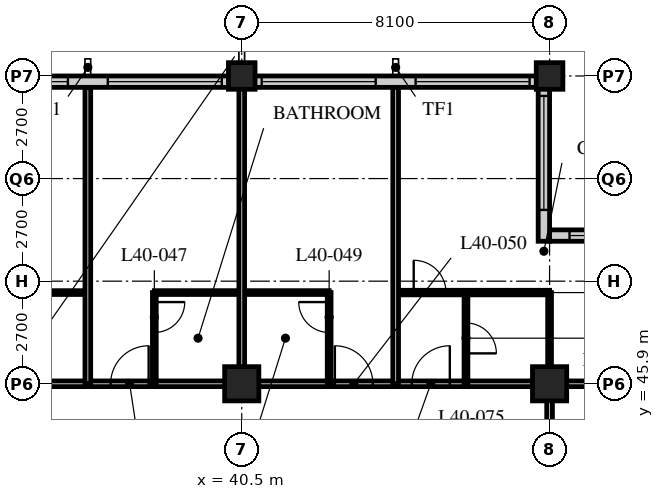
"""IFC4 building model, lengths in metres.
Left out: names, types, materials, properties, quantities, classifications, styles, units other than length and angle.
Written with IfcOpenShell. Run it as: python <this file> out.ifc"""

import sys

from ifc_helpers import new_model, si_unit, direction, frame, frame_2d, origin, origin_2d, place, context, subcontext, project, spatial, rectangle, hollow_rectangle, extrude, element, fill, save


model = new_model("IFC4")
c1 = context("Model", 3, precision=1e-05, world=origin(), true_north=direction((0.0, 1.0)))
c2 = subcontext(c1, "Body", "Model", "MODEL_VIEW")
j1 = project(units=[si_unit("LENGTHUNIT", "METRE"), si_unit("PLANEANGLEUNIT", "RADIAN")], contexts=[c1])
p1 = place(None, origin())
s1 = spatial("IfcSite", under=j1, at=p1, CompositionType="ELEMENT")
p2 = place(p1, origin())
s2 = spatial("IfcBuilding", under=s1, at=p2, CompositionType="ELEMENT")
p3 = place(p2, frame((0.0, 0.0, 154.4)))
s3 = spatial("IfcBuildingStorey", under=s2, at=p3, CompositionType="ELEMENT", Elevation=154.4)
p4 = place(p3, frame((40.5, 45.9, 0.0), z_axis=(0.0, 0.0, 1.0), x_axis=(1.0, 0.0, 0.0)))
e1 = element("IfcColumn", 1, at=p4, inside=s3, PredefinedType="COLUMN", context=c2, shape_type="SweptSolid", body=[
    extrude(hollow_rectangle(XDim=0.9, YDim=0.9, WallThickness=0.1, at=origin_2d()), origin(), (0.0, 0.0, 1.0), 3.4),
])
p5 = place(p3, frame((40.5, 54.0, 0.0), z_axis=(0.0, 0.0, 1.0), x_axis=(1.0, 0.0, 0.0)))
e2 = element("IfcColumn", 2, at=p5, inside=s3, PredefinedType="COLUMN", context=c2, shape_type="SweptSolid", body=[
    extrude(hollow_rectangle(XDim=0.7, YDim=0.7, WallThickness=0.07, at=origin_2d()), origin(), (0.0, 0.0, 1.0), 3.4),
])
p6 = place(p3, frame((48.6, 45.9, 0.0), z_axis=(0.0, 0.0, 1.0), x_axis=(1.0, 0.0, 0.0)))
e3 = element("IfcColumn", 3, at=p6, inside=s3, PredefinedType="COLUMN", context=c2, shape_type="SweptSolid", body=[
    extrude(hollow_rectangle(XDim=0.9, YDim=0.9, WallThickness=0.1, at=origin_2d()), origin(), (0.0, 0.0, 1.0), 3.4),
])
p7 = place(p3, frame((48.6, 54.0, 0.0), z_axis=(0.0, 0.0, 1.0), x_axis=(1.0, 0.0, 0.0)))
e4 = element("IfcColumn", 4, at=p7, inside=s3, PredefinedType="COLUMN", context=c2, shape_type="SweptSolid", body=[
    extrude(hollow_rectangle(XDim=0.7, YDim=0.7, WallThickness=0.07, at=origin_2d()), origin(), (0.0, 0.0, 1.0), 3.4),
])
p8 = place(p3, frame((52.35, 49.8, 0.0), z_axis=(0.0, 0.0, 1.0), x_axis=(-1.0, 0.0, 0.0)))
e5 = element("IfcWall", 5, at=p8, inside=s3, PredefinedType="SOLIDWALL", context=c2, shape_type="SweptSolid", body=[
    extrude(rectangle(XDim=3.75, YDim=0.3, at=frame_2d((1.875, 0.0))), origin(), (0.0, 0.0, 1.0), 2.45),
])
p9 = place(p8, frame((0.225, 0.0, 0.9)))
e6 = element("IfcOpeningElement", 6, at=p9, cuts=e5, PredefinedType="OPENING", context=c2, shape_type="SweptSolid", body=[
    extrude(rectangle(XDim=3.0, YDim=1.2, at=frame_2d((1.5, 0.6))), frame((0.0, 0.16, 0.0), z_axis=(0.0, -1.0, 0.0), x_axis=(1.0, 0.0, 0.0)), (0.0, 0.0, 1.0), 0.32),
])
p10 = place(p3, frame((48.45, 49.65, 0.0), z_axis=(0.0, 0.0, 1.0), x_axis=(0.0, 1.0, 0.0)))
e7 = element("IfcWall", 7, at=p10, inside=s3, PredefinedType="SOLIDWALL", context=c2, shape_type="SweptSolid", body=[
    extrude(rectangle(XDim=4.35, YDim=0.3, at=frame_2d((2.175, 0.0))), origin(), (0.0, 0.0, 1.0), 2.15),
])
p11 = place(p10, frame((0.825, 0.0, 0.9)))
e8 = element("IfcOpeningElement", 8, at=p11, cuts=e7, PredefinedType="OPENING", context=c2, shape_type="SweptSolid", body=[
    extrude(rectangle(XDim=3.0, YDim=1.2, at=frame_2d((1.5, 0.6))), frame((0.0, 0.16, 0.0), z_axis=(0.0, -1.0, 0.0), x_axis=(1.0, 0.0, 0.0)), (0.0, 0.0, 1.0), 0.32),
])
p12 = place(p3, frame((48.3, 53.85, 0.0), z_axis=(0.0, 0.0, 1.0), x_axis=(-1.0, 0.0, 0.0)))
e9 = element("IfcWall", 9, at=p12, inside=s3, PredefinedType="SOLIDWALL", context=c2, shape_type="SweptSolid", body=[
    extrude(rectangle(XDim=40.2, YDim=0.3, at=frame_2d((20.1, 0.0))), origin(), (0.0, 0.0, 1.0), 2.15),
])
p13 = place(p12, frame((0.225, 0.0, 0.9)))
e10 = element("IfcOpeningElement", 10, at=p13, cuts=e9, PredefinedType="OPENING", context=c2, shape_type="SweptSolid", body=[
    extrude(rectangle(XDim=3.0, YDim=1.2, at=frame_2d((1.5, 0.6))), frame((0.0, 0.16, 0.0), z_axis=(0.0, -1.0, 0.0), x_axis=(1.0, 0.0, 0.0)), (0.0, 0.0, 1.0), 0.32),
])
p14 = place(p12, frame((4.275, 0.0, 0.9)))
e11 = element("IfcOpeningElement", 11, at=p14, cuts=e9, PredefinedType="OPENING", context=c2, shape_type="SweptSolid", body=[
    extrude(rectangle(XDim=3.0, YDim=1.2, at=frame_2d((1.5, 0.6))), frame((0.0, 0.16, 0.0), z_axis=(0.0, -1.0, 0.0), x_axis=(1.0, 0.0, 0.0)), (0.0, 0.0, 1.0), 0.32),
])
p15 = place(p12, frame((8.325, 0.0, 0.9)))
e12 = element("IfcOpeningElement", 12, at=p15, cuts=e9, PredefinedType="OPENING", context=c2, shape_type="SweptSolid", body=[
    extrude(rectangle(XDim=3.0, YDim=1.2, at=frame_2d((1.5, 0.6))), frame((0.0, 0.16, 0.0), z_axis=(0.0, -1.0, 0.0), x_axis=(1.0, 0.0, 0.0)), (0.0, 0.0, 1.0), 0.32),
])
p16 = place(p12, frame((12.375, 0.0, 0.9)))
e13 = element("IfcOpeningElement", 13, at=p16, cuts=e9, PredefinedType="OPENING", context=c2, shape_type="SweptSolid", body=[
    extrude(rectangle(XDim=3.0, YDim=1.2, at=frame_2d((1.5, 0.6))), frame((0.0, 0.16, 0.0), z_axis=(0.0, -1.0, 0.0), x_axis=(1.0, 0.0, 0.0)), (0.0, 0.0, 1.0), 0.32),
])
p17 = place(p12, frame((16.425, 0.0, 0.9)))
e14 = element("IfcOpeningElement", 14, at=p17, cuts=e9, PredefinedType="OPENING", context=c2, shape_type="SweptSolid", body=[
    extrude(rectangle(XDim=3.0, YDim=1.2, at=frame_2d((1.5, 0.6))), frame((0.0, 0.16, 0.0), z_axis=(0.0, -1.0, 0.0), x_axis=(1.0, 0.0, 0.0)), (0.0, 0.0, 1.0), 0.32),
])
p18 = place(p12, frame((20.475, 0.0, 0.9)))
e15 = element("IfcOpeningElement", 15, at=p18, cuts=e9, PredefinedType="OPENING", context=c2, shape_type="SweptSolid", body=[
    extrude(rectangle(XDim=3.0, YDim=1.2, at=frame_2d((1.5, 0.6))), frame((0.0, 0.16, 0.0), z_axis=(0.0, -1.0, 0.0), x_axis=(1.0, 0.0, 0.0)), (0.0, 0.0, 1.0), 0.32),
])
p19 = place(p12, frame((24.525, 0.0, 0.9)))
e16 = element("IfcOpeningElement", 16, at=p19, cuts=e9, PredefinedType="OPENING", context=c2, shape_type="SweptSolid", body=[
    extrude(rectangle(XDim=3.0, YDim=1.2, at=frame_2d((1.5, 0.6))), frame((0.0, 0.16, 0.0), z_axis=(0.0, -1.0, 0.0), x_axis=(1.0, 0.0, 0.0)), (0.0, 0.0, 1.0), 0.32),
])
p20 = place(p12, frame((28.575, 0.0, 0.9)))
e17 = element("IfcOpeningElement", 17, at=p20, cuts=e9, PredefinedType="OPENING", context=c2, shape_type="SweptSolid", body=[
    extrude(rectangle(XDim=3.0, YDim=1.2, at=frame_2d((1.5, 0.6))), frame((0.0, 0.16, 0.0), z_axis=(0.0, -1.0, 0.0), x_axis=(1.0, 0.0, 0.0)), (0.0, 0.0, 1.0), 0.32),
])
p21 = place(p12, frame((32.625, 0.0, 0.9)))
e18 = element("IfcOpeningElement", 18, at=p21, cuts=e9, PredefinedType="OPENING", context=c2, shape_type="SweptSolid", body=[
    extrude(rectangle(XDim=3.0, YDim=1.2, at=frame_2d((1.5, 0.6))), frame((0.0, 0.16, 0.0), z_axis=(0.0, -1.0, 0.0), x_axis=(1.0, 0.0, 0.0)), (0.0, 0.0, 1.0), 0.32),
])
p22 = place(p12, frame((36.675, 0.0, 0.9)))
e19 = element("IfcOpeningElement", 19, at=p22, cuts=e9, PredefinedType="OPENING", context=c2, shape_type="SweptSolid", body=[
    extrude(rectangle(XDim=3.0, YDim=1.2, at=frame_2d((1.5, 0.6))), frame((0.0, 0.16, 0.0), z_axis=(0.0, -1.0, 0.0), x_axis=(1.0, 0.0, 0.0)), (0.0, 0.0, 1.0), 0.32),
])
p23 = place(p3, frame((8.1, 45.9, 0.0), z_axis=(0.0, 0.0, 1.0), x_axis=(1.0, 0.0, 0.0)))
e20 = element("IfcWall", 20, at=p23, inside=s3, PredefinedType="PARTITIONING", context=c2, shape_type="SweptSolid", body=[
    extrude(rectangle(XDim=40.5, YDim=0.15, at=frame_2d((20.25, 0.0))), origin(), (0.0, 0.0, 1.0), 2.15),
])
p24 = place(p23, frame((9.625, 0.0, 0.0)))
e21 = element("IfcOpeningElement", 21, at=p24, cuts=e20, PredefinedType="OPENING", context=c2, shape_type="SweptSolid", body=[
    extrude(rectangle(XDim=1.0, YDim=2.1, at=frame_2d((0.5, 1.05))), frame((0.0, 0.085, 0.0), z_axis=(0.0, -1.0, 0.0), x_axis=(1.0, 0.0, 0.0)), (0.0, 0.0, 1.0), 0.17),
])
p25 = place(p23, frame((21.775, 0.0, 0.0)))
e22 = element("IfcOpeningElement", 22, at=p25, cuts=e20, PredefinedType="OPENING", context=c2, shape_type="SweptSolid", body=[
    extrude(rectangle(XDim=1.0, YDim=2.1, at=frame_2d((0.5, 1.05))), frame((0.0, 0.085, 0.0), z_axis=(0.0, -1.0, 0.0), x_axis=(1.0, 0.0, 0.0)), (0.0, 0.0, 1.0), 0.17),
])
p26 = place(p23, frame((28.95, 0.0, 0.0)))
e23 = element("IfcOpeningElement", 23, at=p26, cuts=e20, PredefinedType="OPENING", context=c2, shape_type="SweptSolid", body=[
    extrude(rectangle(XDim=1.0, YDim=2.1, at=frame_2d((0.5, 1.05))), frame((0.0, 0.085, 0.0), z_axis=(0.0, -1.0, 0.0), x_axis=(1.0, 0.0, 0.0)), (0.0, 0.0, 1.0), 0.17),
])
p27 = place(p23, frame((34.85, 0.0, 0.0)))
e24 = element("IfcOpeningElement", 24, at=p27, cuts=e20, PredefinedType="OPENING", context=c2, shape_type="SweptSolid", body=[
    extrude(rectangle(XDim=1.0, YDim=2.1, at=frame_2d((0.5, 1.05))), frame((0.0, 0.085, 0.0), z_axis=(0.0, -1.0, 0.0), x_axis=(1.0, 0.0, 0.0)), (0.0, 0.0, 1.0), 0.17),
])
p28 = place(p23, frame((36.875, 0.0, 0.0)))
e25 = element("IfcOpeningElement", 25, at=p28, cuts=e20, PredefinedType="OPENING", context=c2, shape_type="SweptSolid", body=[
    extrude(rectangle(XDim=1.0, YDim=2.1, at=frame_2d((0.5, 1.05))), frame((0.0, 0.085, 0.0), z_axis=(0.0, -1.0, 0.0), x_axis=(1.0, 0.0, 0.0)), (0.0, 0.0, 1.0), 0.17),
])
p29 = place(p23, frame((2.625, 0.0, 0.0)))
e26 = element("IfcOpeningElement", 26, at=p29, cuts=e20, PredefinedType="OPENING", context=c2, shape_type="SweptSolid", body=[
    extrude(rectangle(XDim=1.0, YDim=2.1, at=frame_2d((0.5, 1.05))), frame((0.0, 0.085, 0.0), z_axis=(0.0, -1.0, 0.0), x_axis=(1.0, 0.0, 0.0)), (0.0, 0.0, 1.0), 0.17),
])
p30 = place(p3, frame((48.6, 17.55, 0.0), z_axis=(0.0, 0.0, 1.0), x_axis=(0.0, 1.0, 0.0)))
e27 = element("IfcWall", 27, at=p30, inside=s3, PredefinedType="PARTITIONING", context=c2, shape_type="SweptSolid", body=[
    extrude(rectangle(XDim=28.35, YDim=0.15, at=frame_2d((14.175, 0.0))), origin(), (0.0, 0.0, 1.0), 2.15),
])
p31 = place(p30, frame((0.3, 0.0, 0.0)))
e28 = element("IfcOpeningElement", 28, at=p31, cuts=e27, PredefinedType="OPENING", context=c2, shape_type="SweptSolid", body=[
    extrude(rectangle(XDim=1.0, YDim=2.1, at=frame_2d((0.5, 1.05))), frame((0.0, 0.085, 0.0), z_axis=(0.0, -1.0, 0.0), x_axis=(1.0, 0.0, 0.0)), (0.0, 0.0, 1.0), 0.17),
])
p32 = place(p30, frame((6.5, 0.0, 0.0)))
e29 = element("IfcOpeningElement", 29, at=p32, cuts=e27, PredefinedType="OPENING", context=c2, shape_type="SweptSolid", body=[
    extrude(rectangle(XDim=1.0, YDim=2.1, at=frame_2d((0.5, 1.05))), frame((0.0, 0.085, 0.0), z_axis=(0.0, -1.0, 0.0), x_axis=(1.0, 0.0, 0.0)), (0.0, 0.0, 1.0), 0.17),
])
p33 = place(p30, frame((13.675, 0.0, 0.0)))
e30 = element("IfcOpeningElement", 30, at=p33, cuts=e27, PredefinedType="OPENING", context=c2, shape_type="SweptSolid", body=[
    extrude(rectangle(XDim=1.0, YDim=2.1, at=frame_2d((0.5, 1.05))), frame((0.0, 0.085, 0.0), z_axis=(0.0, -1.0, 0.0), x_axis=(1.0, 0.0, 0.0)), (0.0, 0.0, 1.0), 0.17),
])
p34 = place(p30, frame((22.7, 0.0, 0.0)))
e31 = element("IfcOpeningElement", 31, at=p34, cuts=e27, PredefinedType="OPENING", context=c2, shape_type="SweptSolid", body=[
    extrude(rectangle(XDim=1.0, YDim=2.1, at=frame_2d((0.5, 1.05))), frame((0.0, 0.085, 0.0), z_axis=(0.0, -1.0, 0.0), x_axis=(1.0, 0.0, 0.0)), (0.0, 0.0, 1.0), 0.17),
])
p35 = place(p30, frame((24.9, 0.0, 0.0)))
e32 = element("IfcOpeningElement", 32, at=p35, cuts=e27, PredefinedType="OPENING", context=c2, shape_type="SweptSolid", body=[
    extrude(rectangle(XDim=1.0, YDim=2.1, at=frame_2d((0.5, 1.05))), frame((0.0, 0.085, 0.0), z_axis=(0.0, -1.0, 0.0), x_axis=(1.0, 0.0, 0.0)), (0.0, 0.0, 1.0), 0.17),
])
p36 = place(p3, frame((33.85, 48.3, 0.0), z_axis=(0.0, 0.0, 1.0), x_axis=(1.0, 0.0, 0.0)))
e33 = element("IfcWall", 33, at=p36, inside=s3, PredefinedType="PARTITIONING", context=c2, shape_type="SweptSolid", body=[
    extrude(rectangle(XDim=2.6, YDim=0.1, at=frame_2d((1.3, 0.0))), origin(), (0.0, 0.0, 1.0), 3.15),
])
p37 = place(p3, frame((36.45, 45.9, 0.0), z_axis=(0.0, 0.0, 1.0), x_axis=(0.0, 1.0, 0.0)))
e34 = element("IfcWall", 34, at=p37, inside=s3, PredefinedType="PARTITIONING", context=c2, shape_type="SweptSolid", body=[
    extrude(rectangle(XDim=7.8, YDim=0.15, at=frame_2d((3.9, 0.0))), origin(), (0.0, 0.0, 1.0), 3.15),
])
p38 = place(p3, frame((38.2, 48.3, 0.0), z_axis=(0.0, 0.0, 1.0), x_axis=(1.0, 0.0, 0.0)))
e35 = element("IfcWall", 35, at=p38, inside=s3, PredefinedType="PARTITIONING", context=c2, shape_type="SweptSolid", body=[
    extrude(rectangle(XDim=4.6, YDim=0.1, at=frame_2d((2.3, 0.0))), origin(), (0.0, 0.0, 1.0), 3.15),
])
p39 = place(p3, frame((38.2, 45.9, 0.0), z_axis=(0.0, 0.0, 1.0), x_axis=(0.0, 1.0, 0.0)))
e36 = element("IfcWall", 36, at=p39, inside=s3, PredefinedType="PARTITIONING", context=c2, shape_type="SweptSolid", body=[
    extrude(rectangle(XDim=2.4, YDim=0.1, at=frame_2d((1.2, 0.0))), origin(), (0.0, 0.0, 1.0), 3.15),
])
p40 = place(p39, frame((1.35, 0.0, 0.0)))
e37 = element("IfcOpeningElement", 37, at=p40, cuts=e36, PredefinedType="OPENING", context=c2, shape_type="SweptSolid", body=[
    extrude(rectangle(XDim=0.8, YDim=2.1, at=frame_2d((0.4, 1.05))), frame((0.0, 0.06, 0.0), z_axis=(0.0, -1.0, 0.0), x_axis=(1.0, 0.0, 0.0)), (0.0, 0.0, 1.0), 0.12),
])
p41 = place(p3, frame((40.5, 45.9, 0.0), z_axis=(0.0, 0.0, 1.0), x_axis=(0.0, 1.0, 0.0)))
e38 = element("IfcWall", 38, at=p41, inside=s3, PredefinedType="PARTITIONING", context=c2, shape_type="SweptSolid", body=[
    extrude(rectangle(XDim=7.8, YDim=0.15, at=frame_2d((3.9, 0.0))), origin(), (0.0, 0.0, 1.0), 2.15),
])
p42 = place(p3, frame((42.8, 45.9, 0.0), z_axis=(0.0, 0.0, 1.0), x_axis=(0.0, 1.0, 0.0)))
e39 = element("IfcWall", 39, at=p42, inside=s3, PredefinedType="PARTITIONING", context=c2, shape_type="SweptSolid", body=[
    extrude(rectangle(XDim=2.4, YDim=0.1, at=frame_2d((1.2, 0.0))), origin(), (0.0, 0.0, 1.0), 3.15),
])
p43 = place(p42, frame((1.35, 0.0, 0.0)))
e40 = element("IfcOpeningElement", 40, at=p43, cuts=e39, PredefinedType="OPENING", context=c2, shape_type="SweptSolid", body=[
    extrude(rectangle(XDim=0.8, YDim=2.1, at=frame_2d((0.4, 1.05))), frame((0.0, 0.06, 0.0), z_axis=(0.0, -1.0, 0.0), x_axis=(1.0, 0.0, 0.0)), (0.0, 0.0, 1.0), 0.12),
])
p44 = place(p3, frame((44.55, 48.3, 0.0), z_axis=(0.0, 0.0, 1.0), x_axis=(1.0, 0.0, 0.0)))
e41 = element("IfcWall", 41, at=p44, inside=s3, PredefinedType="PARTITIONING", context=c2, shape_type="SweptSolid", body=[
    extrude(rectangle(XDim=4.05, YDim=0.12, at=frame_2d((2.025, 0.0))), origin(), (0.0, 0.0, 1.0), 3.15),
])
p45 = place(p44, frame((0.475, 0.0, 0.0)))
e42 = element("IfcOpeningElement", 42, at=p45, cuts=e41, PredefinedType="OPENING", context=c2, shape_type="SweptSolid", body=[
    extrude(rectangle(XDim=0.85, YDim=2.1, at=frame_2d((0.425, 1.05))), frame((0.0, 0.07, 0.0), z_axis=(0.0, -1.0, 0.0), x_axis=(1.0, 0.0, 0.0)), (0.0, 0.0, 1.0), 0.14),
])
p46 = place(p3, frame((46.4, 45.9, 0.0), z_axis=(0.0, 0.0, 1.0), x_axis=(0.0, 1.0, 0.0)))
e43 = element("IfcWall", 43, at=p46, inside=s3, PredefinedType="PARTITIONING", context=c2, shape_type="SweptSolid", body=[
    extrude(rectangle(XDim=2.4, YDim=0.1, at=frame_2d((1.2, 0.0))), origin(), (0.0, 0.0, 1.0), 3.15),
])
p47 = place(p46, frame((0.8, 0.0, 0.0)))
e44 = element("IfcOpeningElement", 44, at=p47, cuts=e43, PredefinedType="OPENING", context=c2, shape_type="SweptSolid", body=[
    extrude(rectangle(XDim=0.8, YDim=2.1, at=frame_2d((0.4, 1.05))), frame((0.0, 0.06, 0.0), z_axis=(0.0, -1.0, 0.0), x_axis=(1.0, 0.0, 0.0)), (0.0, 0.0, 1.0), 0.12),
])
p48 = place(p3, frame((48.6, 45.9, 0.0), z_axis=(0.0, 0.0, 1.0), x_axis=(0.0, 1.0, 0.0)))
e45 = element("IfcWall", 45, at=p48, inside=s3, PredefinedType="PARTITIONING", context=c2, shape_type="SweptSolid", body=[
    extrude(rectangle(XDim=2.4, YDim=0.1, at=frame_2d((1.2, 0.0))), origin(), (0.0, 0.0, 1.0), 2.15),
])
p49 = place(p3, frame((48.6, 45.9, 0.0), z_axis=(0.0, 0.0, 1.0), x_axis=(1.0, 0.0, 0.0)))
e46 = element("IfcWall", 46, at=p49, inside=s3, PredefinedType="PARTITIONING", context=c2, shape_type="SweptSolid", body=[
    extrude(rectangle(XDim=3.75, YDim=0.15, at=frame_2d((1.875, 0.0))), origin(), (0.0, 0.0, 1.0), 2.15),
])
p50 = place(p3, frame((44.55, 45.9, 0.0), z_axis=(0.0, 0.0, 1.0), x_axis=(0.0, 1.0, 0.0)))
e47 = element("IfcWall", 47, at=p50, inside=s3, PredefinedType="PARTITIONING", context=c2, shape_type="SweptSolid", body=[
    extrude(rectangle(XDim=7.8, YDim=0.15, at=frame_2d((3.9, 0.0))), origin(), (0.0, 0.0, 1.0), 3.15),
])
p51 = place(p9, origin())
e48 = element("IfcWindow", 48, at=p51, inside=s3, PartitioningType="SINGLE_PANEL", PredefinedType="WINDOW", context=c2, shape_type="SweptSolid", body=[
    extrude(rectangle(XDim=3.0, YDim=1.2, at=frame_2d((1.5, 0.6))), frame((0.0, 0.03, 0.0), z_axis=(0.0, -1.0, 0.0), x_axis=(1.0, 0.0, 0.0)), (0.0, 0.0, 1.0), 0.06),
])
fill(e6, e48)
p52 = place(p11, origin())
e49 = element("IfcWindow", 49, at=p52, inside=s3, PartitioningType="SINGLE_PANEL", PredefinedType="WINDOW", context=c2, shape_type="SweptSolid", body=[
    extrude(rectangle(XDim=3.0, YDim=1.2, at=frame_2d((1.5, 0.6))), frame((0.0, 0.03, 0.0), z_axis=(0.0, -1.0, 0.0), x_axis=(1.0, 0.0, 0.0)), (0.0, 0.0, 1.0), 0.06),
])
fill(e8, e49)
p53 = place(p13, origin())
e50 = element("IfcWindow", 50, at=p53, inside=s3, PartitioningType="SINGLE_PANEL", PredefinedType="WINDOW", context=c2, shape_type="SweptSolid", body=[
    extrude(rectangle(XDim=3.0, YDim=1.2, at=frame_2d((1.5, 0.6))), frame((0.0, 0.03, 0.0), z_axis=(0.0, -1.0, 0.0), x_axis=(1.0, 0.0, 0.0)), (0.0, 0.0, 1.0), 0.06),
])
fill(e10, e50)
p54 = place(p14, origin())
e51 = element("IfcWindow", 51, at=p54, inside=s3, PartitioningType="SINGLE_PANEL", PredefinedType="WINDOW", context=c2, shape_type="SweptSolid", body=[
    extrude(rectangle(XDim=3.0, YDim=1.2, at=frame_2d((1.5, 0.6))), frame((0.0, 0.03, 0.0), z_axis=(0.0, -1.0, 0.0), x_axis=(1.0, 0.0, 0.0)), (0.0, 0.0, 1.0), 0.06),
])
fill(e11, e51)
p55 = place(p15, origin())
e52 = element("IfcWindow", 52, at=p55, inside=s3, PartitioningType="SINGLE_PANEL", PredefinedType="WINDOW", context=c2, shape_type="SweptSolid", body=[
    extrude(rectangle(XDim=3.0, YDim=1.2, at=frame_2d((1.5, 0.6))), frame((0.0, 0.03, 0.0), z_axis=(0.0, -1.0, 0.0), x_axis=(1.0, 0.0, 0.0)), (0.0, 0.0, 1.0), 0.06),
])
fill(e12, e52)
p56 = place(p16, origin())
e53 = element("IfcWindow", 53, at=p56, inside=s3, PartitioningType="SINGLE_PANEL", PredefinedType="WINDOW", context=c2, shape_type="SweptSolid", body=[
    extrude(rectangle(XDim=3.0, YDim=1.2, at=frame_2d((1.5, 0.6))), frame((0.0, 0.03, 0.0), z_axis=(0.0, -1.0, 0.0), x_axis=(1.0, 0.0, 0.0)), (0.0, 0.0, 1.0), 0.06),
])
fill(e13, e53)
p57 = place(p40, origin())
e54 = element("IfcDoor", 54, at=p57, inside=s3, OperationType="SINGLE_SWING_LEFT", PredefinedType="DOOR", context=c2, shape_type="SweptSolid", body=[
    extrude(rectangle(XDim=0.8, YDim=2.1, at=frame_2d((0.4, 1.05))), frame((0.0, 0.025, 0.0), z_axis=(0.0, -1.0, 0.0), x_axis=(1.0, 0.0, 0.0)), (0.0, 0.0, 1.0), 0.05),
])
fill(e37, e54)
p58 = place(p26, origin())
e55 = element("IfcDoor", 55, at=p58, inside=s3, OperationType="SINGLE_SWING_RIGHT", PredefinedType="DOOR", context=c2, shape_type="SweptSolid", body=[
    extrude(rectangle(XDim=1.0, YDim=2.1, at=frame_2d((0.5, 1.05))), frame((0.0, 0.025, 0.0), z_axis=(0.0, -1.0, 0.0), x_axis=(1.0, 0.0, 0.0)), (0.0, 0.0, 1.0), 0.05),
])
fill(e23, e55)
p59 = place(p43, origin())
e56 = element("IfcDoor", 56, at=p59, inside=s3, OperationType="SINGLE_SWING_RIGHT", PredefinedType="DOOR", context=c2, shape_type="SweptSolid", body=[
    extrude(rectangle(XDim=0.8, YDim=2.1, at=frame_2d((0.4, 1.05))), frame((0.0, 0.025, 0.0), z_axis=(0.0, -1.0, 0.0), x_axis=(1.0, 0.0, 0.0)), (0.0, 0.0, 1.0), 0.05),
])
fill(e40, e56)
p60 = place(p27, origin())
e57 = element("IfcDoor", 57, at=p60, inside=s3, OperationType="SINGLE_SWING_LEFT", PredefinedType="DOOR", context=c2, shape_type="SweptSolid", body=[
    extrude(rectangle(XDim=1.0, YDim=2.1, at=frame_2d((0.5, 1.05))), frame((0.0, 0.025, 0.0), z_axis=(0.0, -1.0, 0.0), x_axis=(1.0, 0.0, 0.0)), (0.0, 0.0, 1.0), 0.05),
])
fill(e24, e57)
p61 = place(p47, origin())
e58 = element("IfcDoor", 58, at=p61, inside=s3, OperationType="SINGLE_SWING_RIGHT", PredefinedType="DOOR", context=c2, shape_type="SweptSolid", body=[
    extrude(rectangle(XDim=0.8, YDim=2.1, at=frame_2d((0.4, 1.05))), frame((0.0, 0.025, 0.0), z_axis=(0.0, -1.0, 0.0), x_axis=(1.0, 0.0, 0.0)), (0.0, 0.0, 1.0), 0.05),
])
fill(e44, e58)
p62 = place(p28, origin())
e59 = element("IfcDoor", 59, at=p62, inside=s3, OperationType="SINGLE_SWING_RIGHT", PredefinedType="DOOR", context=c2, shape_type="SweptSolid", body=[
    extrude(rectangle(XDim=1.0, YDim=2.1, at=frame_2d((0.5, 1.05))), frame((0.0, 0.025, 0.0), z_axis=(0.0, -1.0, 0.0), x_axis=(1.0, 0.0, 0.0)), (0.0, 0.0, 1.0), 0.05),
])
fill(e25, e59)
p63 = place(p45, origin())
e60 = element("IfcDoor", 60, at=p63, inside=s3, OperationType="SINGLE_SWING_LEFT", PredefinedType="DOOR", context=c2, shape_type="SweptSolid", body=[
    extrude(rectangle(XDim=0.85, YDim=2.1, at=frame_2d((0.425, 1.05))), frame((0.0, 0.025, 0.0), z_axis=(0.0, -1.0, 0.0), x_axis=(1.0, 0.0, 0.0)), (0.0, 0.0, 1.0), 0.05),
])
fill(e42, e60)
save(model, sys.argv[1])
